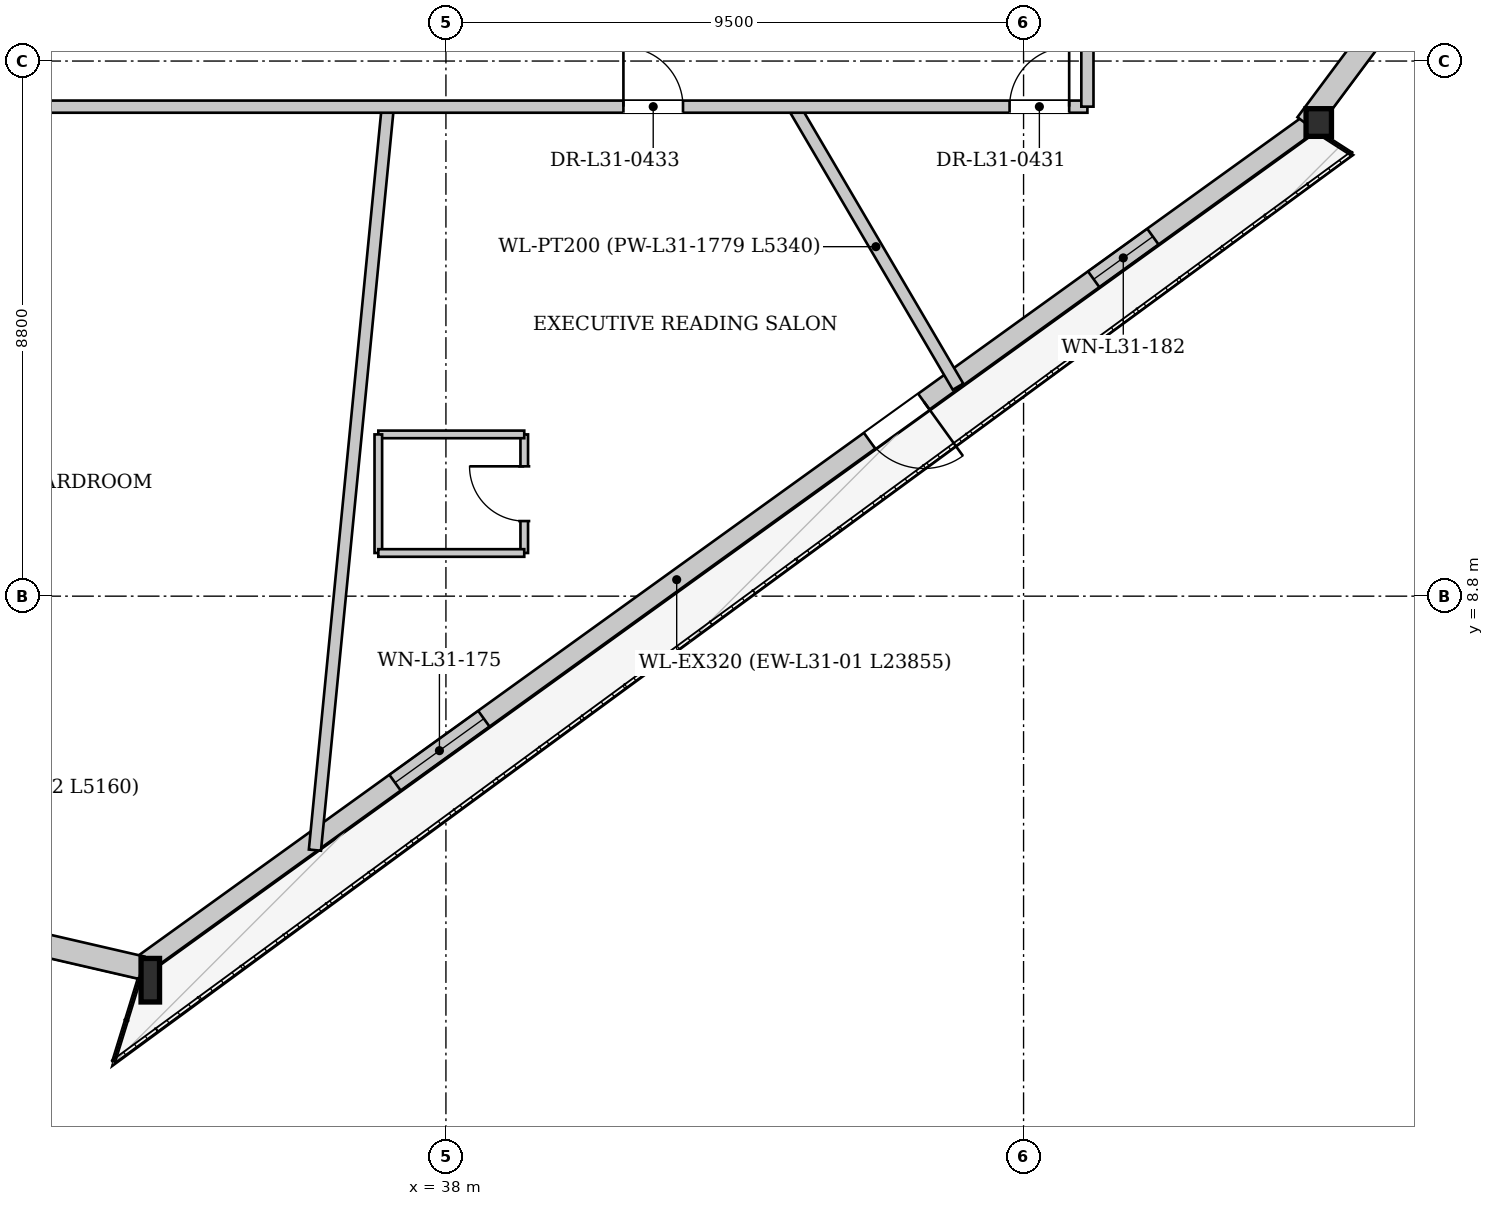
"""IFC4 building model, lengths in metres.
Left out: names, types, materials, properties, quantities, classifications, styles, units other than length and angle.
Written with IfcOpenShell. Run it as: python <this file> out.ifc"""

import sys

from ifc_helpers import new_model, si_unit, direction, frame, frame_2d, origin, origin_2d, place, context, subcontext, project, spatial, rectangle, i_section, extrude, source, transform, mapped, element, fill, save


model = new_model("IFC4")
c1 = context("Model", 3, precision=1e-05, world=origin(), true_north=direction((0.0, 1.0)))
c2 = subcontext(c1, "Body", "Model", "MODEL_VIEW")
j1 = project(units=[si_unit("LENGTHUNIT", "METRE"), si_unit("PLANEANGLEUNIT", "RADIAN")], contexts=[c1])
p1 = place(None, origin())
s1 = spatial("IfcSite", under=j1, at=p1, CompositionType="ELEMENT")
p2 = place(p1, origin())
s2 = spatial("IfcBuilding", under=s1, at=p2, CompositionType="ELEMENT")
p3 = place(p2, frame((0.0, 0.0, 119.9)))
s3 = spatial("IfcBuildingStorey", under=s2, at=p3, CompositionType="ELEMENT", Elevation=119.9)
m1 = source(origin(), c2, "Body", "SweptSolid", [
    extrude(i_section(OverallWidth=0.304, OverallDepth=0.716, WebThickness=0.021, FlangeThickness=0.04, at=origin_2d()), origin(), (0.0, 0.0, 1.0), 3.405),
])
p4 = place(p3, frame((32.955, 2.504, 0.0), z_axis=(0.107551210574, -0.011615530742, 0.994131689742), x_axis=(0.107375600964, 0.994218527446, 0.0)))
e1 = element("IfcColumn", 1, at=p4, inside=s3, PredefinedType="COLUMN", context=c2, shape_type="MappedRepresentation", body=[
    mapped(m1, transform((0.0, 0.0, 0.0), x_axis=(1.0, 0.0, 0.0), y_axis=(0.0, 1.0, 0.0), z_axis=(0.0, 0.0, 1.0), scale=1.0)),
])
m2 = source(origin(), c2, "Body", "SweptSolid", [
    extrude(i_section(OverallWidth=0.418, OverallDepth=0.455, WebThickness=0.038, FlangeThickness=0.059, at=origin_2d()), origin(), (0.0, 0.0, 1.0), 3.398),
])
p5 = place(p3, frame((52.309, 16.449, 0.0), z_axis=(0.026872697938, 0.082486249285, 0.996229831306), x_axis=(-0.950814714798, 0.309760194542, 0.0)))
e2 = element("IfcColumn", 2, at=p5, inside=s3, PredefinedType="COLUMN", context=c2, shape_type="MappedRepresentation", body=[
    mapped(m2, transform((0.0, 0.0, 0.0), x_axis=(1.0, 0.0, 0.0), y_axis=(0.0, 1.0, 0.0), z_axis=(0.0, 0.0, 1.0), scale=1.0)),
])
p6 = place(p3, frame((52.216, 16.579, 0.0), z_axis=(0.0, 0.0, 1.0), x_axis=(-0.811343672804, -0.584569452334, 0.0)))
e3 = element("IfcWall", 3, at=p6, inside=s3, PredefinedType="SOLIDWALL", context=c2, shape_type="SweptSolid", body=[
    extrude(rectangle(XDim=23.855, YDim=0.32, at=frame_2d((11.927, 0.0))), origin(), (0.0, 0.0, 1.0), 2.692),
])
p7 = place(p6, frame((7.834, 0.0, 0.0)))
e4 = element("IfcOpeningElement", 4, at=p7, cuts=e3, PredefinedType="OPENING", context=c2, shape_type="SweptSolid", body=[
    extrude(rectangle(XDim=1.1, YDim=2.3, at=frame_2d((0.55, 1.15))), frame((0.0, 0.17, 0.0), z_axis=(0.0, -1.0, 0.0), x_axis=(1.0, 0.0, 0.0)), (0.0, 0.0, 1.0), 0.34),
])
p8 = place(p6, frame((16.753, 0.0, 0.372)))
e5 = element("IfcOpeningElement", 5, at=p8, cuts=e3, PredefinedType="OPENING", context=c2, shape_type="SweptSolid", body=[
    extrude(rectangle(XDim=1.8, YDim=2.2, at=frame_2d((0.9, 1.1))), frame((0.0, 0.17, 0.0), z_axis=(0.0, -1.0, 0.0), x_axis=(1.0, 0.0, 0.0)), (0.0, 0.0, 1.0), 0.34),
])
p9 = place(p6, frame((3.191, 0.0, 0.65)))
e6 = element("IfcOpeningElement", 6, at=p9, cuts=e3, PredefinedType="OPENING", context=c2, shape_type="SweptSolid", body=[
    extrude(rectangle(XDim=1.2, YDim=1.5, at=frame_2d((0.6, 0.75))), frame((0.0, 0.17, 0.0), z_axis=(0.0, -1.0, 0.0), x_axis=(1.0, 0.0, 0.0)), (0.0, 0.0, 1.0), 0.34),
])
p10 = place(p3, frame((32.997, 2.689, 0.0), z_axis=(0.0, 0.0, 1.0), x_axis=(-0.97437763842, 0.22491824681, 0.0)))
e7 = element("IfcWall", 7, at=p10, inside=s3, PredefinedType="SOLIDWALL", context=c2, shape_type="SweptSolid", body=[
    extrude(rectangle(XDim=5.16, YDim=0.38, at=frame_2d((2.58, 0.0))), origin(), (0.0, 0.0, 1.0), 2.692),
])
p11 = place(p3, frame((66.404, 35.695, 0.0), z_axis=(0.0, 0.0, 1.0), x_axis=(-0.59725858194, -0.802048743094, 0.0)))
e8 = element("IfcWall", 8, at=p11, inside=s3, PredefinedType="SOLIDWALL", context=c2, shape_type="SweptSolid", body=[
    extrude(rectangle(XDim=23.855, YDim=0.38, at=frame_2d((11.927, 0.0))), origin(), (0.0, 0.0, 1.0), 2.692),
])
p12 = place(p11, frame((5.579, 0.0, 0.322)))
e9 = element("IfcOpeningElement", 9, at=p12, cuts=e8, PredefinedType="OPENING", context=c2, shape_type="SweptSolid", body=[
    extrude(rectangle(XDim=2.2, YDim=2.25, at=frame_2d((1.1, 1.125))), frame((0.0, 0.2, 0.0), z_axis=(0.0, -1.0, 0.0), x_axis=(1.0, 0.0, 0.0)), (0.0, 0.0, 1.0), 0.4),
])
p13 = place(p11, frame((14.476, 0.0, 0.322)))
e10 = element("IfcOpeningElement", 10, at=p13, cuts=e8, PredefinedType="OPENING", context=c2, shape_type="SweptSolid", body=[
    extrude(rectangle(XDim=2.2, YDim=2.25, at=frame_2d((1.1, 1.125))), frame((0.0, 0.2, 0.0), z_axis=(0.0, -1.0, 0.0), x_axis=(1.0, 0.0, 0.0)), (0.0, 0.0, 1.0), 0.4),
])
p14 = place(p3, frame((43.72, 16.85, 0.0), z_axis=(0.0, 0.0, 1.0), x_axis=(0.506032751864, -0.862514263094, 0.0)))
e11 = element("IfcWall", 11, at=p14, inside=s3, PredefinedType="PARTITIONING", context=c2, shape_type="SweptSolid", body=[
    extrude(rectangle(XDim=5.34, YDim=0.2, at=frame_2d((2.67, 0.0))), origin(), (0.0, 0.0, 1.0), 3.3),
])
p15 = place(p3, frame((37.044, 16.85, 0.0), z_axis=(0.0, 0.0, 1.0), x_axis=(-0.097575283555, -0.995228146728, 0.0)))
e12 = element("IfcWall", 12, at=p15, inside=s3, PredefinedType="PARTITIONING", context=c2, shape_type="SweptSolid", body=[
    extrude(rectangle(XDim=12.285, YDim=0.2, at=frame_2d((6.143, 0.0))), origin(), (0.0, 0.0, 1.0), 3.3),
])
p16 = place(p3, frame((39.288, 9.51, 0.0), z_axis=(0.0, 0.0, 1.0), x_axis=(0.0, 1.0, 0.0)))
e13 = element("IfcWall", 13, at=p16, inside=s3, PredefinedType="PARTITIONING", context=c2, shape_type="SweptSolid", body=[
    extrude(rectangle(XDim=1.95, YDim=0.125, at=frame_2d((0.975, 0.0))), origin(), (0.0, 0.0, 1.0), 3.3),
])
p17 = place(p16, frame((0.525, 0.0, 0.0)))
e14 = element("IfcOpeningElement", 14, at=p17, cuts=e13, PredefinedType="OPENING", context=c2, shape_type="SweptSolid", body=[
    extrude(rectangle(XDim=0.9, YDim=2.1, at=frame_2d((0.45, 1.05))), frame((0.0, 0.073, 0.0), z_axis=(0.0, -1.0, 0.0), x_axis=(1.0, 0.0, 0.0)), (0.0, 0.0, 1.0), 0.145),
])
p18 = place(p3, frame((39.288, 11.46, 0.0), z_axis=(0.0, 0.0, 1.0), x_axis=(-1.0, 0.0, 0.0)))
e15 = element("IfcWall", 15, at=p18, inside=s3, PredefinedType="PARTITIONING", context=c2, shape_type="SweptSolid", body=[
    extrude(rectangle(XDim=2.4, YDim=0.125, at=frame_2d((1.2, 0.0))), origin(), (0.0, 0.0, 1.0), 2.925),
])
p19 = place(p3, frame((36.888, 11.46, 0.0), z_axis=(0.0, 0.0, 1.0), x_axis=(0.0, -1.0, 0.0)))
e16 = element("IfcWall", 16, at=p19, inside=s3, PredefinedType="PARTITIONING", context=c2, shape_type="SweptSolid", body=[
    extrude(rectangle(XDim=1.95, YDim=0.125, at=frame_2d((0.975, 0.0))), origin(), (0.0, 0.0, 1.0), 3.3),
])
p20 = place(p3, frame((36.888, 9.51, 0.0), z_axis=(0.0, 0.0, 1.0), x_axis=(1.0, 0.0, 0.0)))
e17 = element("IfcWall", 17, at=p20, inside=s3, PredefinedType="PARTITIONING", context=c2, shape_type="SweptSolid", body=[
    extrude(rectangle(XDim=2.4, YDim=0.125, at=frame_2d((1.2, 0.0))), origin(), (0.0, 0.0, 1.0), 3.3),
])
p21 = place(p3, frame((27.45, 16.85, 0.0), z_axis=(0.0, 0.0, 1.0), x_axis=(1.0, 0.0, 0.0)))
e18 = element("IfcWall", 18, at=p21, inside=s3, PredefinedType="PARTITIONING", context=c2, shape_type="SweptSolid", body=[
    extrude(rectangle(XDim=21.1, YDim=0.2, at=frame_2d((10.55, 0.0))), origin(), (0.0, 0.0, 1.0), 2.925),
])
p22 = place(p21, frame((19.82, 0.0, 0.0)))
e19 = element("IfcOpeningElement", 19, at=p22, cuts=e18, PredefinedType="OPENING", context=c2, shape_type="SweptSolid", body=[
    extrude(rectangle(XDim=0.98, YDim=2.15, at=frame_2d((0.49, 1.075))), frame((0.0, 0.11, 0.0), z_axis=(0.0, -1.0, 0.0), x_axis=(1.0, 0.0, 0.0)), (0.0, 0.0, 1.0), 0.22),
])
p23 = place(p21, frame((2.278, 0.0, 0.0)))
e20 = element("IfcOpeningElement", 20, at=p23, cuts=e18, PredefinedType="OPENING", context=c2, shape_type="SweptSolid", body=[
    extrude(rectangle(XDim=0.98, YDim=2.15, at=frame_2d((0.49, 1.075))), frame((0.0, 0.11, 0.0), z_axis=(0.0, -1.0, 0.0), x_axis=(1.0, 0.0, 0.0)), (0.0, 0.0, 1.0), 0.22),
])
p24 = place(p21, frame((13.469, 0.0, 0.0)))
e21 = element("IfcOpeningElement", 21, at=p24, cuts=e18, PredefinedType="OPENING", context=c2, shape_type="SweptSolid", body=[
    extrude(rectangle(XDim=0.98, YDim=2.15, at=frame_2d((0.49, 1.075))), frame((0.0, 0.11, 0.0), z_axis=(0.0, -1.0, 0.0), x_axis=(1.0, 0.0, 0.0)), (0.0, 0.0, 1.0), 0.22),
])
p25 = place(p3, frame((48.55, 16.85, 0.0), z_axis=(0.0, 0.0, 1.0), x_axis=(0.0, 1.0, 0.0)))
e22 = element("IfcWall", 22, at=p25, inside=s3, PredefinedType="PARTITIONING", context=c2, shape_type="SweptSolid", body=[
    extrude(rectangle(XDim=19.5, YDim=0.2, at=frame_2d((9.75, 0.0))), origin(), (0.0, 0.0, 1.0), 3.3),
])
p26 = place(p25, frame((10.652, 0.0, 0.0)))
e23 = element("IfcOpeningElement", 23, at=p26, cuts=e22, PredefinedType="OPENING", context=c2, shape_type="SweptSolid", body=[
    extrude(rectangle(XDim=0.98, YDim=2.15, at=frame_2d((0.49, 1.075))), frame((0.0, 0.11, 0.0), z_axis=(0.0, -1.0, 0.0), x_axis=(1.0, 0.0, 0.0)), (0.0, 0.0, 1.0), 0.22),
])
m3 = source(origin(), c2, "Body", "SweptSolid", [
    extrude(rectangle(XDim=1.1, YDim=2.3, at=frame_2d((0.55, 1.15))), frame((0.0, 0.025, 0.0), z_axis=(0.0, -1.0, 0.0), x_axis=(1.0, 0.0, 0.0)), (0.0, 0.0, 1.0), 0.05),
])
p27 = place(p7, origin())
e24 = element("IfcDoor", 24, at=p27, inside=s3, OperationType="SINGLE_SWING_LEFT", PredefinedType="DOOR", context=c2, shape_type="MappedRepresentation", body=[
    mapped(m3, transform((0.0, 0.0, 0.0), x_axis=(1.0, 0.0, 0.0), y_axis=(0.0, 1.0, 0.0), z_axis=(0.0, 0.0, 1.0), scale=1.0)),
])
fill(e4, e24)
m4 = source(origin(), c2, "Body", "SweptSolid", [
    extrude(rectangle(XDim=1.8, YDim=2.2, at=frame_2d((0.9, 1.1))), frame((0.0, 0.03, 0.0), z_axis=(0.0, -1.0, 0.0), x_axis=(1.0, 0.0, 0.0)), (0.0, 0.0, 1.0), 0.06),
])
p28 = place(p8, origin())
e25 = element("IfcWindow", 25, at=p28, inside=s3, PartitioningType="SINGLE_PANEL", PredefinedType="WINDOW", context=c2, shape_type="MappedRepresentation", body=[
    mapped(m4, transform((0.0, 0.0, 0.0), x_axis=(1.0, 0.0, 0.0), y_axis=(0.0, 1.0, 0.0), z_axis=(0.0, 0.0, 1.0), scale=1.0)),
])
fill(e5, e25)
m5 = source(origin(), c2, "Body", "SweptSolid", [
    extrude(rectangle(XDim=1.2, YDim=1.5, at=frame_2d((0.6, 0.75))), frame((0.0, 0.03, 0.0), z_axis=(0.0, -1.0, 0.0), x_axis=(1.0, 0.0, 0.0)), (0.0, 0.0, 1.0), 0.06),
])
p29 = place(p9, origin())
e26 = element("IfcWindow", 26, at=p29, inside=s3, PartitioningType="SINGLE_PANEL", PredefinedType="WINDOW", context=c2, shape_type="MappedRepresentation", body=[
    mapped(m5, transform((0.0, 0.0, 0.0), x_axis=(1.0, 0.0, 0.0), y_axis=(0.0, 1.0, 0.0), z_axis=(0.0, 0.0, 1.0), scale=1.0)),
])
fill(e6, e26)
m6 = source(origin(), c2, "Body", "SweptSolid", [
    extrude(rectangle(XDim=0.9, YDim=2.1, at=frame_2d((0.45, 1.05))), frame((0.0, 0.025, 0.0), z_axis=(0.0, -1.0, 0.0), x_axis=(1.0, 0.0, 0.0)), (0.0, 0.0, 1.0), 0.05),
])
p30 = place(p17, origin())
e27 = element("IfcDoor", 27, at=p30, inside=s3, OperationType="SINGLE_SWING_RIGHT", PredefinedType="DOOR", context=c2, shape_type="MappedRepresentation", body=[
    mapped(m6, transform((0.0, 0.0, 0.0), x_axis=(1.0, 0.0, 0.0), y_axis=(0.0, 1.0, 0.0), z_axis=(0.0, 0.0, 1.0), scale=1.0)),
])
fill(e14, e27)
m7 = source(origin(), c2, "Body", "SweptSolid", [
    extrude(rectangle(XDim=0.98, YDim=2.15, at=frame_2d((0.49, 1.075))), frame((0.0, 0.025, 0.0), z_axis=(0.0, -1.0, 0.0), x_axis=(1.0, 0.0, 0.0)), (0.0, 0.0, 1.0), 0.05),
])
p31 = place(p22, origin())
e28 = element("IfcDoor", 28, at=p31, inside=s3, OperationType="SINGLE_SWING_RIGHT", PredefinedType="DOOR", context=c2, shape_type="MappedRepresentation", body=[
    mapped(m7, transform((0.0, 0.0, 0.0), x_axis=(1.0, 0.0, 0.0), y_axis=(0.0, 1.0, 0.0), z_axis=(0.0, 0.0, 1.0), scale=1.0)),
])
fill(e19, e28)
p32 = place(p24, origin())
e29 = element("IfcDoor", 29, at=p32, inside=s3, OperationType="SINGLE_SWING_LEFT", PredefinedType="DOOR", context=c2, shape_type="MappedRepresentation", body=[
    mapped(m7, transform((0.0, 0.0, 0.0), x_axis=(1.0, 0.0, 0.0), y_axis=(0.0, 1.0, 0.0), z_axis=(0.0, 0.0, 1.0), scale=1.0)),
])
fill(e21, e29)
save(model, sys.argv[1])
